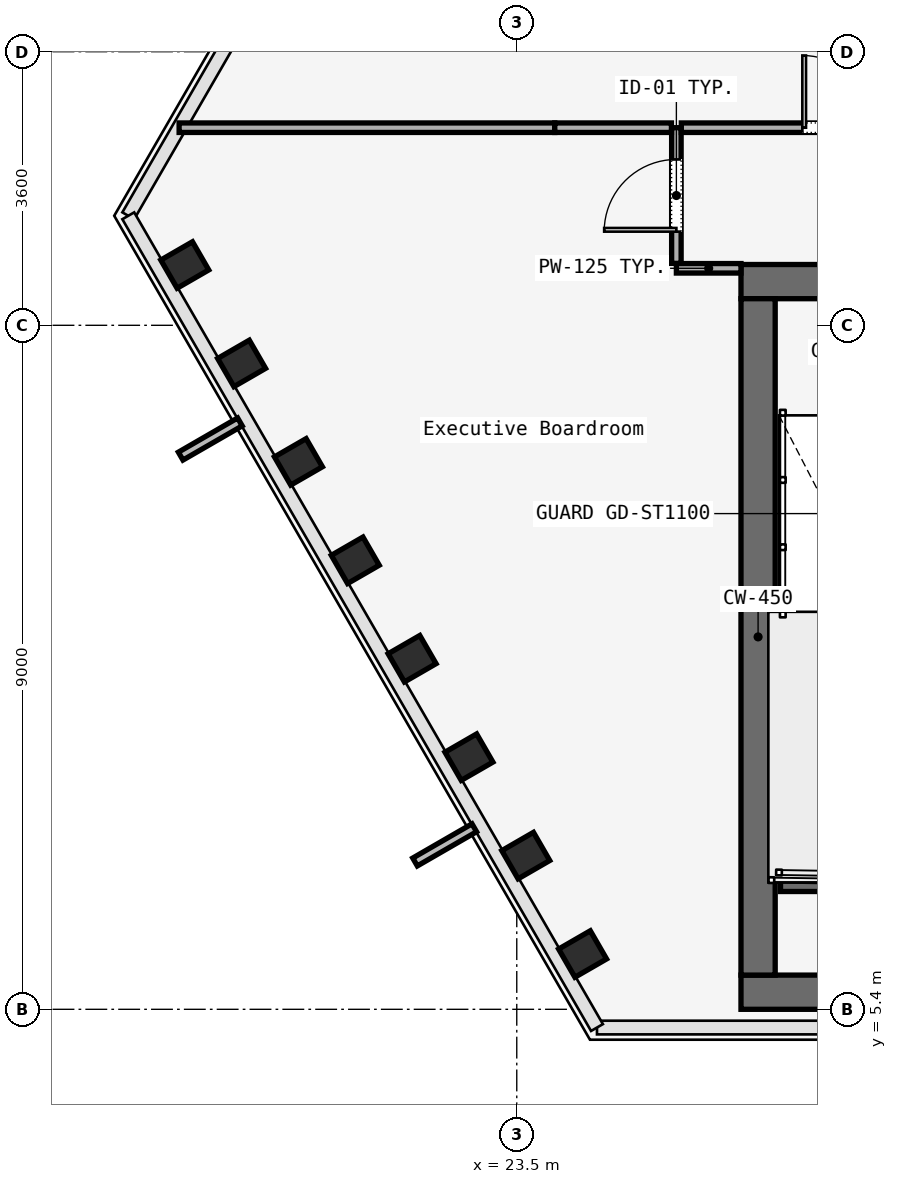
"""IFC4 building model, lengths in metres.
Left out: names, types, materials, properties, quantities, classifications, styles, units other than length and angle.
Written with IfcOpenShell. Run it as: python <this file> out.ifc"""

import sys

from ifc_helpers import new_model, si_unit, direction, frame, frame_2d, origin, origin_2d, place, context, subcontext, project, spatial, rectangle, i_section, extrude, element, fill, save


model = new_model("IFC4")
c1 = context("Model", 3, precision=1e-05, world=origin(), true_north=direction((0.0, 1.0)))
c2 = subcontext(c1, "Body", "Model", "MODEL_VIEW")
j1 = project(units=[si_unit("LENGTHUNIT", "METRE"), si_unit("PLANEANGLEUNIT", "RADIAN")], contexts=[c1])
p1 = place(None, origin())
s1 = spatial("IfcSite", under=j1, at=p1, CompositionType="ELEMENT")
p2 = place(p1, origin())
s2 = spatial("IfcBuilding", under=s1, at=p2, CompositionType="ELEMENT")
p3 = place(p2, frame((0.0, 0.0, 130.8)))
s3 = spatial("IfcBuildingStorey", under=s2, at=p3, CompositionType="ELEMENT", Elevation=130.8)
p4 = place(p3, frame((26.45, 14.975, 0.0), z_axis=(0.0, 0.0, 1.0), x_axis=(1.0, 0.0, 0.0)))
e1 = element("IfcWall", 1, at=p4, inside=s3, PredefinedType="SOLIDWALL", context=c2, shape_type="SweptSolid", body=[
    extrude(rectangle(XDim=31.1, YDim=0.45, at=frame_2d((15.55, 0.0))), origin(), (0.0, 0.0, 1.0), 3.58),
])
p5 = place(p4, frame((1.65, 0.0, 0.0)))
e2 = element("IfcOpeningElement", 2, at=p5, cuts=e1, PredefinedType="OPENING", context=c2, shape_type="SweptSolid", body=[
    extrude(rectangle(XDim=1.1, YDim=2.2, at=frame_2d((0.55, 1.1))), frame((0.0, 0.225, 0.0), z_axis=(0.0, -1.0, 0.0), x_axis=(1.0, 0.0, 0.0)), (0.0, 0.0, 1.0), 0.45),
])
p6 = place(p4, frame((13.65, 0.0, 0.0)))
e3 = element("IfcOpeningElement", 3, at=p6, cuts=e1, PredefinedType="OPENING", context=c2, shape_type="SweptSolid", body=[
    extrude(rectangle(XDim=1.1, YDim=2.2, at=frame_2d((0.55, 1.1))), frame((0.0, 0.225, 0.0), z_axis=(0.0, -1.0, 0.0), x_axis=(1.0, 0.0, 0.0)), (0.0, 0.0, 1.0), 0.45),
])
p7 = place(p4, frame((25.55, 0.0, 0.0)))
e4 = element("IfcOpeningElement", 4, at=p7, cuts=e1, PredefinedType="OPENING", context=c2, shape_type="SweptSolid", body=[
    extrude(rectangle(XDim=1.1, YDim=2.2, at=frame_2d((0.55, 1.1))), frame((0.0, 0.225, 0.0), z_axis=(0.0, -1.0, 0.0), x_axis=(1.0, 0.0, 0.0)), (0.0, 0.0, 1.0), 0.45),
])
p8 = place(p4, frame((10.7, 0.0, 0.0)))
e5 = element("IfcOpeningElement", 5, at=p8, cuts=e1, PredefinedType="OPENING", context=c2, shape_type="SweptSolid", body=[
    extrude(rectangle(XDim=1.4, YDim=2.2, at=frame_2d((0.7, 1.1))), frame((0.0, 0.225, 0.0), z_axis=(0.0, -1.0, 0.0), x_axis=(1.0, 0.0, 0.0)), (0.0, 0.0, 1.0), 0.45),
])
p9 = place(p4, frame((19.35, 0.0, 0.0)))
e6 = element("IfcOpeningElement", 6, at=p9, cuts=e1, PredefinedType="OPENING", context=c2, shape_type="SweptSolid", body=[
    extrude(rectangle(XDim=1.1, YDim=2.2, at=frame_2d((0.55, 1.1))), frame((0.0, 0.225, 0.0), z_axis=(0.0, -1.0, 0.0), x_axis=(1.0, 0.0, 0.0)), (0.0, 0.0, 1.0), 0.45),
])
p10 = place(p4, frame((21.4, 0.0, 0.0)))
e7 = element("IfcOpeningElement", 7, at=p10, cuts=e1, PredefinedType="OPENING", context=c2, shape_type="SweptSolid", body=[
    extrude(rectangle(XDim=0.9, YDim=2.1, at=frame_2d((0.45, 1.05))), frame((0.0, 0.225, 0.0), z_axis=(0.0, -1.0, 0.0), x_axis=(1.0, 0.0, 0.0)), (0.0, 0.0, 1.0), 0.45),
])
p11 = place(p4, frame((23.35, 0.0, 0.0)))
e8 = element("IfcOpeningElement", 8, at=p11, cuts=e1, PredefinedType="OPENING", context=c2, shape_type="SweptSolid", body=[
    extrude(rectangle(XDim=1.3, YDim=2.3, at=frame_2d((0.65, 1.15))), frame((0.0, 0.225, 0.0), z_axis=(0.0, -1.0, 0.0), x_axis=(1.0, 0.0, 0.0)), (0.0, 0.0, 1.0), 0.45),
])
p12 = place(p3, frame((26.45, 5.625, 0.0), z_axis=(0.0, 0.0, 1.0), x_axis=(1.0, 0.0, 0.0)))
e9 = element("IfcWall", 9, at=p12, inside=s3, PredefinedType="SOLIDWALL", context=c2, shape_type="SweptSolid", body=[
    extrude(rectangle(XDim=31.1, YDim=0.45, at=frame_2d((15.55, 0.0))), origin(), (0.0, 0.0, 1.0), 3.58),
])
p13 = place(p3, frame((26.675, 5.85, 0.0), z_axis=(0.0, 0.0, 1.0), x_axis=(0.0, 1.0, 0.0)))
e10 = element("IfcWall", 10, at=p13, inside=s3, PredefinedType="SOLIDWALL", context=c2, shape_type="SweptSolid", body=[
    extrude(rectangle(XDim=8.9, YDim=0.45, at=frame_2d((4.45, 0.0))), origin(), (0.0, 0.0, 1.0), 3.58),
])
for number, where, z_axis, x_axis in (
    (11, (19.132, 15.194, 0.0), (0.0, 0.0, 1.0), (-0.5, 0.866, 0.0)),
    (12, (19.88, 13.898, 0.0), (0.0, 0.0, 1.0), (-0.5, 0.866, 0.0)),
    (13, (20.627, 12.603, 0.0), (0.0, 0.0, 1.0), (-0.5, 0.866, 0.0)),
    (14, (21.375, 11.308, 0.0), (0.0, 0.0, 1.0), (-0.5, 0.866, 0.0)),
    (15, (22.123, 10.013, 0.0), (0.0, 0.0, 1.0), (-0.5, 0.866, 0.0)),
    (16, (22.871, 8.718, 0.0), (0.0, 0.0, 1.0), (-0.5, 0.866, 0.0)),
    (17, (23.618, 7.423, 0.0), (0.0, 0.0, 1.0), (-0.5, 0.866, 0.0)),
    (18, (24.366, 6.128, 0.0), (0.0, 0.0, 1.0), (-0.5, 0.866, 0.0)),
):
    element("IfcColumn", number, at=place(p3, frame(where, z_axis=z_axis, x_axis=x_axis)), inside=s3, PredefinedType="COLUMN", context=c2, shape_type="SweptSolid", body=[
        extrude(i_section(OverallWidth=0.428, OverallDepth=0.481, WebThickness=0.051, FlangeThickness=0.065, FilletRadius=0.015, at=origin_2d()), origin(), (0.0, 0.0, 1.0), 3.58),
    ])
p14 = place(p3, frame((26.97, 7.05, 0.0), z_axis=(0.0, 0.0, 1.0), x_axis=(1.0, 0.0, 0.0)))
e19 = element("IfcWall", 19, at=p14, inside=s3, PredefinedType="SOLIDWALL", context=c2, shape_type="SweptSolid", body=[
    extrude(rectangle(XDim=3.115, YDim=0.2, at=frame_2d((1.558, 0.0))), origin(), (0.0, 0.0, 1.0), 3.8),
])
p15 = place(p3, frame((26.45, 15.15, 0.0), z_axis=(0.0, 0.0, 1.0), x_axis=(-1.0, 0.0, 0.0)))
e20 = element("IfcWall", 20, at=p15, inside=s3, PredefinedType="PARTITIONING", context=c2, shape_type="SweptSolid", body=[
    extrude(rectangle(XDim=0.85, YDim=0.125, at=frame_2d((0.425, 0.0))), origin(), (0.0, 0.0, 1.0), 3.01),
])
p16 = place(p3, frame((25.6, 15.215, 0.0), z_axis=(0.0, 0.0, 1.0), x_axis=(0.0, 1.0, 0.0)))
e21 = element("IfcWall", 21, at=p16, inside=s3, PredefinedType="PARTITIONING", context=c2, shape_type="SweptSolid", body=[
    extrude(rectangle(XDim=1.785, YDim=0.125, at=frame_2d((0.893, 0.0))), origin(), (0.0, 0.0, 1.0), 3.01),
])
p17 = place(p16, frame((0.417, 0.0, 0.0)))
e22 = element("IfcOpeningElement", 22, at=p17, cuts=e21, PredefinedType="OPENING", context=c2, shape_type="SweptSolid", body=[
    extrude(rectangle(XDim=0.95, YDim=2.2, at=frame_2d((0.475, 1.1))), frame((0.0, 0.062, 0.0), z_axis=(0.0, -1.0, 0.0), x_axis=(1.0, 0.0, 0.0)), (0.0, 0.0, 1.0), 0.125),
])
p18 = place(p3, frame((25.665, 17.0, 0.0), z_axis=(0.0, 0.0, 1.0), x_axis=(1.0, 0.0, 0.0)))
e23 = element("IfcWall", 23, at=p18, inside=s3, PredefinedType="PARTITIONING", context=c2, shape_type="SweptSolid", body=[
    extrude(rectangle(XDim=4.135, YDim=0.125, at=frame_2d((2.067, 0.0))), origin(), (0.0, 0.0, 1.0), 3.01),
])
p19 = place(p18, frame((1.593, 0.0, 0.0)))
e24 = element("IfcOpeningElement", 24, at=p19, cuts=e23, PredefinedType="OPENING", context=c2, shape_type="SweptSolid", body=[
    extrude(rectangle(XDim=0.95, YDim=2.2, at=frame_2d((0.475, 1.1))), frame((0.0, 0.062, 0.0), z_axis=(0.0, -1.0, 0.0), x_axis=(1.0, 0.0, 0.0)), (0.0, 0.0, 1.0), 0.125),
])
p20 = place(p3, frame((19.058, 17.0, 0.0), z_axis=(0.0, 0.0, 1.0), x_axis=(1.0, 0.0, 0.0)))
e25 = element("IfcWall", 25, at=p20, inside=s3, PredefinedType="PARTITIONING", context=c2, shape_type="SweptSolid", body=[
    extrude(rectangle(XDim=4.942, YDim=0.125, at=frame_2d((2.471, 0.0))), origin(), (0.0, 0.0, 1.0), 3.01),
])
p21 = place(p3, frame((24.0, 17.0, 0.0), z_axis=(0.0, 0.0, 1.0), x_axis=(1.0, 0.0, 0.0)))
e26 = element("IfcWall", 26, at=p21, inside=s3, PredefinedType="PARTITIONING", context=c2, shape_type="SweptSolid", body=[
    extrude(rectangle(XDim=1.535, YDim=0.125, at=frame_2d((0.768, 0.0))), origin(), (0.0, 0.0, 1.0), 3.01),
])
p22 = place(p17, origin())
e27 = element("IfcDoor", 27, at=p22, inside=s3, OperationType="SINGLE_SWING_LEFT", PredefinedType="DOOR", context=c2, shape_type="SweptSolid", body=[
    extrude(rectangle(XDim=0.95, YDim=2.2, at=frame_2d((0.475, 1.1))), frame((0.0, 0.025, 0.0), z_axis=(0.0, -1.0, 0.0), x_axis=(1.0, 0.0, 0.0)), (0.0, 0.0, 1.0), 0.05),
])
fill(e22, e27)
p23 = place(p19, origin())
e28 = element("IfcDoor", 28, at=p23, inside=s3, OperationType="SINGLE_SWING_RIGHT", PredefinedType="DOOR", context=c2, shape_type="SweptSolid", body=[
    extrude(rectangle(XDim=0.95, YDim=2.2, at=frame_2d((0.475, 1.1))), frame((0.0, 0.025, 0.0), z_axis=(0.0, -1.0, 0.0), x_axis=(1.0, 0.0, 0.0)), (0.0, 0.0, 1.0), 0.05),
])
fill(e24, e28)
save(model, sys.argv[1])
